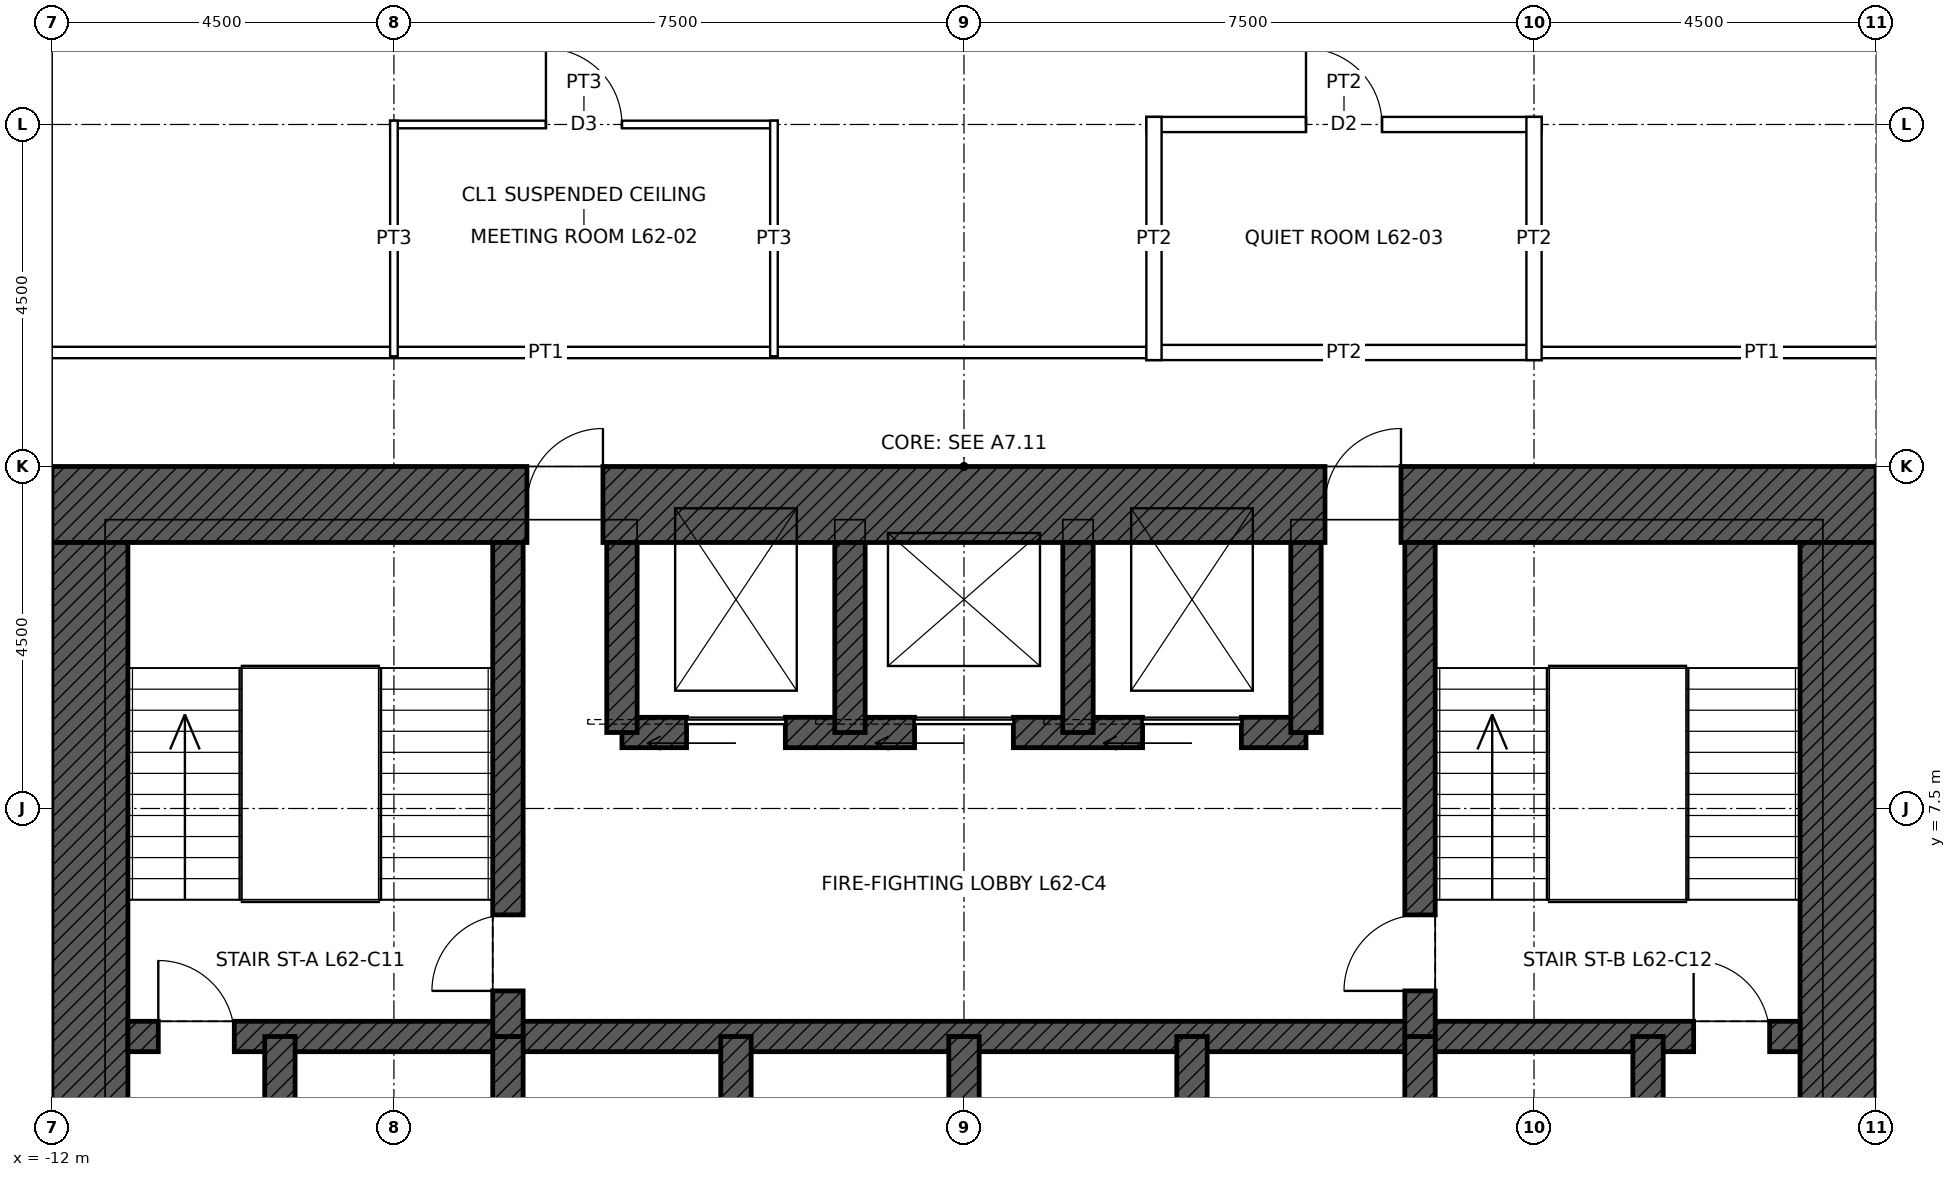
"""IFC4 building model, lengths in metres.
Left out: names, types, materials, properties, quantities, classifications, styles, units other than length and angle.
Written with IfcOpenShell. Run it as: python <this file> out.ifc"""

import sys

from ifc_helpers import new_model, si_unit, direction, frame, frame_2d, origin, place, context, subcontext, project, spatial, rectangle, extrude, element, fill, save


model = new_model("IFC4")
c1 = context("Model", 3, precision=1e-05, world=origin(), true_north=direction((0.0, 1.0)))
c2 = subcontext(c1, "Body", "Model", "MODEL_VIEW")
j1 = project(units=[si_unit("LENGTHUNIT", "METRE"), si_unit("PLANEANGLEUNIT", "RADIAN")], contexts=[c1])
p1 = place(None, origin())
s1 = spatial("IfcSite", under=j1, at=p1, CompositionType="ELEMENT")
p2 = place(p1, origin())
s2 = spatial("IfcBuilding", under=s1, at=p2, CompositionType="ELEMENT")
p3 = place(p2, frame((0.0, 0.0, 283.9)))
s3 = spatial("IfcBuildingStorey", under=s2, at=p3, CompositionType="ELEMENT", Elevation=283.9)
p4 = place(p3, frame((-12.0, 11.5, 0.0), z_axis=(0.0, 0.0, 1.0), x_axis=(1.0, 0.0, 0.0)))
e1 = element("IfcWall", 1, at=p4, inside=s3, PredefinedType="SHEAR", context=c2, shape_type="SweptSolid", body=[
    extrude(rectangle(XDim=24.0, YDim=1.0, at=frame_2d((12.0, 0.0))), origin(), (0.0, 0.0, 1.0), 4.0),
])
p5 = place(p4, frame((6.25, 0.0, 0.0)))
e2 = element("IfcOpeningElement", 2, at=p5, cuts=e1, PredefinedType="OPENING", context=c2, shape_type="SweptSolid", body=[
    extrude(rectangle(XDim=1.0, YDim=2.4, at=frame_2d((0.5, 1.2))), frame((0.0, 0.51, 0.0), z_axis=(0.0, -1.0, 0.0), x_axis=(1.0, 0.0, 0.0)), (0.0, 0.0, 1.0), 1.02),
])
p6 = place(p4, frame((16.75, 0.0, 0.0)))
e3 = element("IfcOpeningElement", 3, at=p6, cuts=e1, PredefinedType="OPENING", context=c2, shape_type="SweptSolid", body=[
    extrude(rectangle(XDim=1.0, YDim=2.4, at=frame_2d((0.5, 1.2))), frame((0.0, 0.51, 0.0), z_axis=(0.0, -1.0, 0.0), x_axis=(1.0, 0.0, 0.0)), (0.0, 0.0, 1.0), 1.02),
])
p7 = place(p3, frame((11.5, 11.0, 0.0), z_axis=(0.0, 0.0, 1.0), x_axis=(0.0, -1.0, 0.0)))
e4 = element("IfcWall", 4, at=p7, inside=s3, PredefinedType="SHEAR", context=c2, shape_type="SweptSolid", body=[
    extrude(rectangle(XDim=22.0, YDim=1.0, at=frame_2d((11.0, 0.0))), origin(), (0.0, 0.0, 1.0), 4.0),
])
p8 = place(p7, frame((10.5, 0.0, 0.0)))
e5 = element("IfcOpeningElement", 5, at=p8, cuts=e4, PredefinedType="OPENING", context=c2, shape_type="SweptSolid", body=[
    extrude(rectangle(XDim=1.0, YDim=2.4, at=frame_2d((0.5, 1.2))), frame((0.0, 0.51, 0.0), z_axis=(0.0, -1.0, 0.0), x_axis=(1.0, 0.0, 0.0)), (0.0, 0.0, 1.0), 1.02),
])
p9 = place(p3, frame((-11.5, -11.0, 0.0), z_axis=(0.0, 0.0, 1.0), x_axis=(0.0, 1.0, 0.0)))
e6 = element("IfcWall", 6, at=p9, inside=s3, PredefinedType="SHEAR", context=c2, shape_type="SweptSolid", body=[
    extrude(rectangle(XDim=22.0, YDim=1.0, at=frame_2d((11.0, 0.0))), origin(), (0.0, 0.0, 1.0), 4.0),
])
p10 = place(p9, frame((10.5, 0.0, 0.0)))
e7 = element("IfcOpeningElement", 7, at=p10, cuts=e6, PredefinedType="OPENING", context=c2, shape_type="SweptSolid", body=[
    extrude(rectangle(XDim=1.0, YDim=2.4, at=frame_2d((0.5, 1.2))), frame((0.0, 0.51, 0.0), z_axis=(0.0, -1.0, 0.0), x_axis=(1.0, 0.0, 0.0)), (0.0, 0.0, 1.0), 1.02),
])
p11 = place(p3, frame((-11.0, 4.5, 0.0), z_axis=(0.0, 0.0, 1.0), x_axis=(1.0, 0.0, 0.0)))
e8 = element("IfcWall", 8, at=p11, inside=s3, PredefinedType="SHEAR", context=c2, shape_type="SweptSolid", body=[
    extrude(rectangle(XDim=22.0, YDim=0.4, at=frame_2d((11.0, 0.0))), origin(), (0.0, 0.0, 1.0), 4.0),
])
p12 = place(p11, frame((0.4, 0.0, 0.0)))
e9 = element("IfcOpeningElement", 9, at=p12, cuts=e8, PredefinedType="OPENING", context=c2, shape_type="SweptSolid", body=[
    extrude(rectangle(XDim=1.0, YDim=2.1, at=frame_2d((0.5, 1.05))), frame((0.0, 0.21, 0.0), z_axis=(0.0, -1.0, 0.0), x_axis=(1.0, 0.0, 0.0)), (0.0, 0.0, 1.0), 0.42),
])
p13 = place(p11, frame((20.6, 0.0, 0.0)))
e10 = element("IfcOpeningElement", 10, at=p13, cuts=e8, PredefinedType="OPENING", context=c2, shape_type="SweptSolid", body=[
    extrude(rectangle(XDim=1.0, YDim=2.1, at=frame_2d((0.5, 1.05))), frame((0.0, 0.21, 0.0), z_axis=(0.0, -1.0, 0.0), x_axis=(1.0, 0.0, 0.0)), (0.0, 0.0, 1.0), 0.42),
])
p14 = place(p3, frame((-4.5, 8.5, 0.0), z_axis=(0.0, 0.0, 1.0), x_axis=(1.0, 0.0, 0.0)))
e11 = element("IfcWall", 11, at=p14, inside=s3, PredefinedType="SHEAR", context=c2, shape_type="SweptSolid", body=[
    extrude(rectangle(XDim=9.0, YDim=0.4, at=frame_2d((4.5, 0.0))), origin(), (0.0, 0.0, 1.0), 4.0),
])
p15 = place(p14, frame((0.85, 0.0, 0.0)))
e12 = element("IfcOpeningElement", 12, at=p15, cuts=e11, PredefinedType="OPENING", context=c2, shape_type="SweptSolid", body=[
    extrude(rectangle(XDim=1.3, YDim=2.4, at=frame_2d((0.65, 1.2))), frame((0.0, 0.21, 0.0), z_axis=(0.0, -1.0, 0.0), x_axis=(1.0, 0.0, 0.0)), (0.0, 0.0, 1.0), 0.42),
])
p16 = place(p14, frame((6.85, 0.0, 0.0)))
e13 = element("IfcOpeningElement", 13, at=p16, cuts=e11, PredefinedType="OPENING", context=c2, shape_type="SweptSolid", body=[
    extrude(rectangle(XDim=1.3, YDim=2.4, at=frame_2d((0.65, 1.2))), frame((0.0, 0.21, 0.0), z_axis=(0.0, -1.0, 0.0), x_axis=(1.0, 0.0, 0.0)), (0.0, 0.0, 1.0), 0.42),
])
p17 = place(p14, frame((3.85, 0.0, 0.0)))
e14 = element("IfcOpeningElement", 14, at=p17, cuts=e11, PredefinedType="OPENING", context=c2, shape_type="SweptSolid", body=[
    extrude(rectangle(XDim=1.3, YDim=2.4, at=frame_2d((0.65, 1.2))), frame((0.0, 0.21, 0.0), z_axis=(0.0, -1.0, 0.0), x_axis=(1.0, 0.0, 0.0)), (0.0, 0.0, 1.0), 0.42),
])
for number, where, z_axis, x_axis in (
    (15, (-9.0, 1.5, 0.0), (0.0, 0.0, 1.0), (0.0, 1.0, 0.0)),
    (16, (9.0, 1.5, 0.0), (0.0, 0.0, 1.0), (0.0, 1.0, 0.0)),
    (17, (-6.0, 1.5, 0.0), (0.0, 0.0, 1.0), (0.0, 1.0, 0.0)),
    (18, (-3.0, 1.5, 0.0), (0.0, 0.0, 1.0), (0.0, 1.0, 0.0)),
    (19, (0.0, 1.5, 0.0), (0.0, 0.0, 1.0), (0.0, 1.0, 0.0)),
    (20, (3.0, 1.5, 0.0), (0.0, 0.0, 1.0), (0.0, 1.0, 0.0)),
    (21, (6.0, 1.5, 0.0), (0.0, 0.0, 1.0), (0.0, 1.0, 0.0)),
):
    element("IfcWall", number, at=place(p3, frame(where, z_axis=z_axis, x_axis=x_axis)), inside=s3, PredefinedType="SHEAR", context=c2, shape_type="SweptSolid", body=[
        extrude(rectangle(XDim=3.0, YDim=0.4, at=frame_2d((1.5, 0.0))), origin(), (0.0, 0.0, 1.0), 4.0),
    ])
p18 = place(p3, frame((-6.0, 4.5, 0.0), z_axis=(0.0, 0.0, 1.0), x_axis=(0.0, 1.0, 0.0)))
e22 = element("IfcWall", 22, at=p18, inside=s3, PredefinedType="SHEAR", context=c2, shape_type="SweptSolid", body=[
    extrude(rectangle(XDim=6.5, YDim=0.4, at=frame_2d((3.25, 0.0))), origin(), (0.0, 0.0, 1.0), 4.0),
])
p19 = place(p18, frame((0.6, 0.0, 0.0)))
e23 = element("IfcOpeningElement", 23, at=p19, cuts=e22, PredefinedType="OPENING", context=c2, shape_type="SweptSolid", body=[
    extrude(rectangle(XDim=1.0, YDim=2.1, at=frame_2d((0.5, 1.05))), frame((0.0, 0.21, 0.0), z_axis=(0.0, -1.0, 0.0), x_axis=(1.0, 0.0, 0.0)), (0.0, 0.0, 1.0), 0.42),
])
p20 = place(p3, frame((6.0, 4.5, 0.0), z_axis=(0.0, 0.0, 1.0), x_axis=(0.0, 1.0, 0.0)))
e24 = element("IfcWall", 24, at=p20, inside=s3, PredefinedType="SHEAR", context=c2, shape_type="SweptSolid", body=[
    extrude(rectangle(XDim=6.5, YDim=0.4, at=frame_2d((3.25, 0.0))), origin(), (0.0, 0.0, 1.0), 4.0),
])
p21 = place(p20, frame((0.6, 0.0, 0.0)))
e25 = element("IfcOpeningElement", 25, at=p21, cuts=e24, PredefinedType="OPENING", context=c2, shape_type="SweptSolid", body=[
    extrude(rectangle(XDim=1.0, YDim=2.1, at=frame_2d((0.5, 1.05))), frame((0.0, 0.21, 0.0), z_axis=(0.0, -1.0, 0.0), x_axis=(1.0, 0.0, 0.0)), (0.0, 0.0, 1.0), 0.42),
])
for number, where, z_axis, x_axis in (
    (26, (-4.5, 8.5, 0.0), (0.0, 0.0, 1.0), (0.0, 1.0, 0.0)),
    (27, (4.5, 8.5, 0.0), (0.0, 0.0, 1.0), (0.0, 1.0, 0.0)),
    (28, (-1.5, 8.5, 0.0), (0.0, 0.0, 1.0), (0.0, 1.0, 0.0)),
    (29, (1.5, 8.5, 0.0), (0.0, 0.0, 1.0), (0.0, 1.0, 0.0)),
):
    element("IfcWall", number, at=place(p3, frame(where, z_axis=z_axis, x_axis=x_axis)), inside=s3, PredefinedType="SHEAR", context=c2, shape_type="SweptSolid", body=[
        extrude(rectangle(XDim=2.5, YDim=0.4, at=frame_2d((1.25, 0.0))), origin(), (0.0, 0.0, 1.0), 4.0),
    ])
p22 = place(p3, frame((-13.575, 13.5, 0.0), z_axis=(0.0, 0.0, 1.0), x_axis=(1.0, 0.0, 0.0)))
e30 = element("IfcWall", 30, at=p22, inside=s3, PredefinedType="PARTITIONING", context=c2, shape_type="SweptSolid", body=[
    extrude(rectangle(XDim=16.15, YDim=0.15, at=frame_2d((8.075, 0.0))), origin(), (0.0, 0.0, 1.0), 3.85),
])
p23 = place(p3, frame((2.4, 13.5, 0.0), z_axis=(0.0, 0.0, 1.0), x_axis=(1.0, 0.0, 0.0)))
e31 = element("IfcWall", 31, at=p23, inside=s3, PredefinedType="PARTITIONING", context=c2, shape_type="SweptSolid", body=[
    extrude(rectangle(XDim=5.2, YDim=0.2, at=frame_2d((2.6, 0.0))), origin(), (0.0, 0.0, 1.0), 3.85),
])
p24 = place(p3, frame((7.425, 13.5, 0.0), z_axis=(0.0, 0.0, 1.0), x_axis=(1.0, 0.0, 0.0)))
e32 = element("IfcWall", 32, at=p24, inside=s3, PredefinedType="PARTITIONING", context=c2, shape_type="SweptSolid", body=[
    extrude(rectangle(XDim=6.15, YDim=0.15, at=frame_2d((3.075, 0.0))), origin(), (0.0, 0.0, 1.0), 3.85),
])
p25 = place(p3, frame((-7.55, 16.5, 0.0), z_axis=(0.0, 0.0, 1.0), x_axis=(1.0, 0.0, 0.0)))
e33 = element("IfcWall", 33, at=p25, inside=s3, PredefinedType="PARTITIONING", context=c2, shape_type="SweptSolid", body=[
    extrude(rectangle(XDim=5.1, YDim=0.1, at=frame_2d((2.55, 0.0))), origin(), (0.0, 0.0, 1.0), 3.85),
])
p26 = place(p25, frame((2.05, 0.0, 0.0)))
e34 = element("IfcOpeningElement", 34, at=p26, cuts=e33, PredefinedType="OPENING", context=c2, shape_type="SweptSolid", body=[
    extrude(rectangle(XDim=1.0, YDim=2.1, at=frame_2d((0.5, 1.05))), frame((0.0, 0.06, 0.0), z_axis=(0.0, -1.0, 0.0), x_axis=(1.0, 0.0, 0.0)), (0.0, 0.0, 1.0), 0.12),
])
p27 = place(p3, frame((2.4, 16.5, 0.0), z_axis=(0.0, 0.0, 1.0), x_axis=(1.0, 0.0, 0.0)))
e35 = element("IfcWall", 35, at=p27, inside=s3, PredefinedType="PARTITIONING", context=c2, shape_type="SweptSolid", body=[
    extrude(rectangle(XDim=5.2, YDim=0.2, at=frame_2d((2.6, 0.0))), origin(), (0.0, 0.0, 1.0), 3.85),
])
p28 = place(p27, frame((2.1, 0.0, 0.0)))
e36 = element("IfcOpeningElement", 36, at=p28, cuts=e35, PredefinedType="OPENING", context=c2, shape_type="SweptSolid", body=[
    extrude(rectangle(XDim=1.0, YDim=2.1, at=frame_2d((0.5, 1.05))), frame((0.0, 0.11, 0.0), z_axis=(0.0, -1.0, 0.0), x_axis=(1.0, 0.0, 0.0)), (0.0, 0.0, 1.0), 0.22),
])
p29 = place(p3, frame((-7.5, 13.45, 0.0), z_axis=(0.0, 0.0, 1.0), x_axis=(0.0, 1.0, 0.0)))
e37 = element("IfcWall", 37, at=p29, inside=s3, PredefinedType="PARTITIONING", context=c2, shape_type="SweptSolid", body=[
    extrude(rectangle(XDim=3.1, YDim=0.1, at=frame_2d((1.55, 0.0))), origin(), (0.0, 0.0, 1.0), 3.243),
])
p30 = place(p3, frame((-2.5, 13.45, 0.0), z_axis=(0.0, 0.0, 1.0), x_axis=(0.0, 1.0, 0.0)))
e38 = element("IfcWall", 38, at=p30, inside=s3, PredefinedType="PARTITIONING", context=c2, shape_type="SweptSolid", body=[
    extrude(rectangle(XDim=3.1, YDim=0.1, at=frame_2d((1.55, 0.0))), origin(), (0.0, 0.0, 1.0), 3.85),
])
p31 = place(p3, frame((2.5, 13.4, 0.0), z_axis=(0.0, 0.0, 1.0), x_axis=(0.0, 1.0, 0.0)))
e39 = element("IfcWall", 39, at=p31, inside=s3, PredefinedType="PARTITIONING", context=c2, shape_type="SweptSolid", body=[
    extrude(rectangle(XDim=3.2, YDim=0.2, at=frame_2d((1.6, 0.0))), origin(), (0.0, 0.0, 1.0), 3.85),
])
p32 = place(p3, frame((7.5, 13.4, 0.0), z_axis=(0.0, 0.0, 1.0), x_axis=(0.0, 1.0, 0.0)))
e40 = element("IfcWall", 40, at=p32, inside=s3, PredefinedType="PARTITIONING", context=c2, shape_type="SweptSolid", body=[
    extrude(rectangle(XDim=3.2, YDim=0.2, at=frame_2d((1.6, 0.0))), origin(), (0.0, 0.0, 1.0), 3.243),
])
p33 = place(p12, origin())
e41 = element("IfcDoor", 41, at=p33, inside=s3, OperationType="SINGLE_SWING_LEFT", PredefinedType="DOOR", context=c2, shape_type="SweptSolid", body=[
    extrude(rectangle(XDim=1.0, YDim=2.1, at=frame_2d((0.5, 1.05))), frame((0.0, 0.025, 0.0), z_axis=(0.0, -1.0, 0.0), x_axis=(1.0, 0.0, 0.0)), (0.0, 0.0, 1.0), 0.05),
])
fill(e9, e41)
p34 = place(p13, origin())
e42 = element("IfcDoor", 42, at=p34, inside=s3, OperationType="SINGLE_SWING_LEFT", PredefinedType="DOOR", context=c2, shape_type="SweptSolid", body=[
    extrude(rectangle(XDim=1.0, YDim=2.1, at=frame_2d((0.5, 1.05))), frame((0.0, 0.025, 0.0), z_axis=(0.0, -1.0, 0.0), x_axis=(1.0, 0.0, 0.0)), (0.0, 0.0, 1.0), 0.05),
])
fill(e10, e42)
p35 = place(p19, origin())
e43 = element("IfcDoor", 43, at=p35, inside=s3, OperationType="SINGLE_SWING_LEFT", PredefinedType="DOOR", context=c2, shape_type="SweptSolid", body=[
    extrude(rectangle(XDim=1.0, YDim=2.1, at=frame_2d((0.5, 1.05))), frame((0.0, 0.025, 0.0), z_axis=(0.0, -1.0, 0.0), x_axis=(1.0, 0.0, 0.0)), (0.0, 0.0, 1.0), 0.05),
])
fill(e23, e43)
p36 = place(p21, origin())
e44 = element("IfcDoor", 44, at=p36, inside=s3, OperationType="SINGLE_SWING_LEFT", PredefinedType="DOOR", context=c2, shape_type="SweptSolid", body=[
    extrude(rectangle(XDim=1.0, YDim=2.1, at=frame_2d((0.5, 1.05))), frame((0.0, 0.025, 0.0), z_axis=(0.0, -1.0, 0.0), x_axis=(1.0, 0.0, 0.0)), (0.0, 0.0, 1.0), 0.05),
])
fill(e25, e44)
p37 = place(p5, origin())
e45 = element("IfcDoor", 45, at=p37, inside=s3, OperationType="SINGLE_SWING_RIGHT", PredefinedType="DOOR", context=c2, shape_type="SweptSolid", body=[
    extrude(rectangle(XDim=1.0, YDim=2.4, at=frame_2d((0.5, 1.2))), frame((0.0, 0.485, 0.0), z_axis=(0.0, -1.0, 0.0), x_axis=(1.0, 0.0, 0.0)), (0.0, 0.0, 1.0), 0.05),
])
fill(e2, e45)
p38 = place(p6, origin())
e46 = element("IfcDoor", 46, at=p38, inside=s3, OperationType="SINGLE_SWING_RIGHT", PredefinedType="DOOR", context=c2, shape_type="SweptSolid", body=[
    extrude(rectangle(XDim=1.0, YDim=2.4, at=frame_2d((0.5, 1.2))), frame((0.0, 0.485, 0.0), z_axis=(0.0, -1.0, 0.0), x_axis=(1.0, 0.0, 0.0)), (0.0, 0.0, 1.0), 0.05),
])
fill(e3, e46)
p39 = place(p15, origin())
e47 = element("IfcDoor", 47, at=p39, inside=s3, OperationType="SLIDING_TO_LEFT", PredefinedType="DOOR", context=c2, shape_type="SweptSolid", body=[
    extrude(rectangle(XDim=1.3, YDim=2.4, at=frame_2d((0.65, 1.2))), frame((0.0, 0.025, 0.0), z_axis=(0.0, -1.0, 0.0), x_axis=(1.0, 0.0, 0.0)), (0.0, 0.0, 1.0), 0.05),
])
fill(e12, e47)
p40 = place(p16, origin())
e48 = element("IfcDoor", 48, at=p40, inside=s3, OperationType="SLIDING_TO_LEFT", PredefinedType="DOOR", context=c2, shape_type="SweptSolid", body=[
    extrude(rectangle(XDim=1.3, YDim=2.4, at=frame_2d((0.65, 1.2))), frame((0.0, 0.025, 0.0), z_axis=(0.0, -1.0, 0.0), x_axis=(1.0, 0.0, 0.0)), (0.0, 0.0, 1.0), 0.05),
])
fill(e13, e48)
p41 = place(p17, origin())
e49 = element("IfcDoor", 49, at=p41, inside=s3, OperationType="SLIDING_TO_LEFT", PredefinedType="DOOR", context=c2, shape_type="SweptSolid", body=[
    extrude(rectangle(XDim=1.3, YDim=2.4, at=frame_2d((0.65, 1.2))), frame((0.0, 0.025, 0.0), z_axis=(0.0, -1.0, 0.0), x_axis=(1.0, 0.0, 0.0)), (0.0, 0.0, 1.0), 0.05),
])
fill(e14, e49)
p42 = place(p26, origin())
e50 = element("IfcDoor", 50, at=p42, inside=s3, OperationType="SINGLE_SWING_LEFT", PredefinedType="DOOR", context=c2, shape_type="SweptSolid", body=[
    extrude(rectangle(XDim=1.0, YDim=2.1, at=frame_2d((0.5, 1.05))), frame((0.0, 0.025, 0.0), z_axis=(0.0, -1.0, 0.0), x_axis=(1.0, 0.0, 0.0)), (0.0, 0.0, 1.0), 0.05),
])
fill(e34, e50)
p43 = place(p28, origin())
e51 = element("IfcDoor", 51, at=p43, inside=s3, OperationType="SINGLE_SWING_LEFT", PredefinedType="DOOR", context=c2, shape_type="SweptSolid", body=[
    extrude(rectangle(XDim=1.0, YDim=2.1, at=frame_2d((0.5, 1.05))), frame((0.0, 0.025, 0.0), z_axis=(0.0, -1.0, 0.0), x_axis=(1.0, 0.0, 0.0)), (0.0, 0.0, 1.0), 0.05),
])
fill(e36, e51)
save(model, sys.argv[1])
